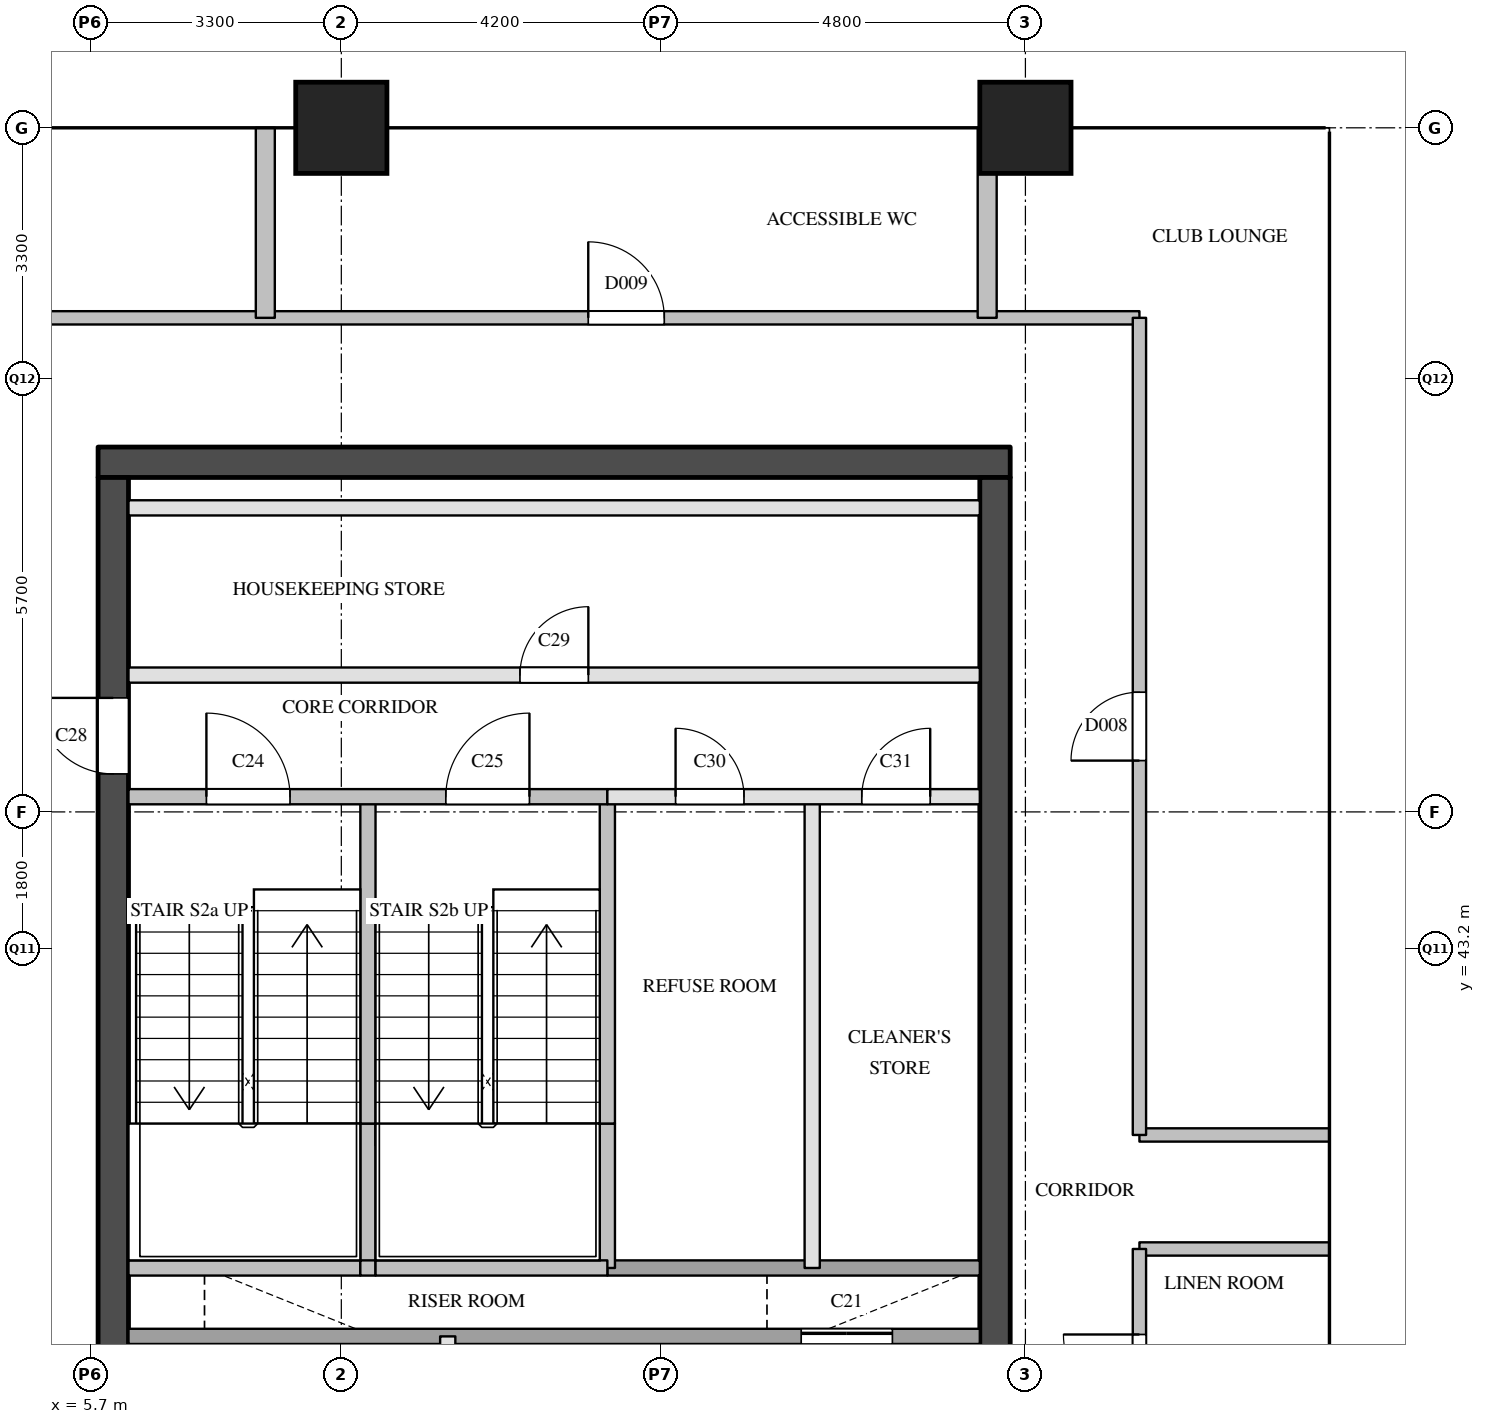
"""IFC4 building model, lengths in metres.
Left out: names, types, materials, properties, quantities, classifications, styles, units other than length and angle.
Written with IfcOpenShell. Run it as: python <this file> out.ifc"""

import sys

from ifc_helpers import new_model, si_unit, direction, frame, frame_2d, origin, origin_2d, place, context, subcontext, project, spatial, rectangle, extrude, element, fill, save


model = new_model("IFC4")
c1 = context("Model", 3, precision=1e-05, world=origin(), true_north=direction((0.0, 1.0)))
c2 = subcontext(c1, "Body", "Model", "MODEL_VIEW")
j1 = project(units=[si_unit("LENGTHUNIT", "METRE"), si_unit("PLANEANGLEUNIT", "RADIAN")], contexts=[c1])
p1 = place(None, origin())
s1 = spatial("IfcSite", under=j1, at=p1, CompositionType="ELEMENT")
p2 = place(p1, origin())
s2 = spatial("IfcBuilding", under=s1, at=p2, CompositionType="ELEMENT")
p3 = place(p2, frame((0.0, 0.0, 211.1)))
s3 = spatial("IfcBuildingStorey", under=s2, at=p3, CompositionType="ELEMENT", Elevation=211.1)
for number, where, z_axis, x_axis in (
    (1, (9.0, 54.0, 0.0), (0.0, 0.0, 1.0), (1.0, 0.0, 0.0)),
    (2, (18.0, 54.0, 0.0), (0.0, 0.0, 1.0), (1.0, 0.0, 0.0)),
):
    element("IfcColumn", number, at=place(p3, frame(where, z_axis=z_axis, x_axis=x_axis)), inside=s3, PredefinedType="COLUMN", context=c2, shape_type="SweptSolid", body=[
        extrude(rectangle(XDim=1.2, YDim=1.2, at=origin_2d()), origin(), (0.0, 0.0, 1.0), 3.9),
    ])
p4 = place(p3, frame((5.8, 49.6, 0.0), z_axis=(0.0, 0.0, 1.0), x_axis=(1.0, 0.0, 0.0)))
e3 = element("IfcWall", 3, at=p4, inside=s3, PredefinedType="SHEAR", context=c2, shape_type="SweptSolid", body=[
    extrude(rectangle(XDim=12.0, YDim=0.4, at=frame_2d((6.0, 0.0))), origin(), (0.0, 0.0, 1.0), 3.6),
])
p5 = place(p3, frame((6.0, 29.1, 0.0), z_axis=(0.0, 0.0, 1.0), x_axis=(0.0, 1.0, 0.0)))
e4 = element("IfcWall", 4, at=p5, inside=s3, PredefinedType="SHEAR", context=c2, shape_type="SweptSolid", body=[
    extrude(rectangle(XDim=20.3, YDim=0.4, at=frame_2d((10.15, 0.0))), origin(), (0.0, 0.0, 1.0), 3.6),
])
p6 = place(p5, frame((3.45, 0.0, 0.0)))
e5 = element("IfcOpeningElement", 5, at=p6, cuts=e4, PredefinedType="OPENING", context=c2, shape_type="SweptSolid", body=[
    extrude(rectangle(XDim=1.0, YDim=2.1, at=frame_2d((0.5, 1.05))), frame((0.0, 0.21, 0.0), z_axis=(0.0, -1.0, 0.0), x_axis=(1.0, 0.0, 0.0)), (0.0, 0.0, 1.0), 0.42),
])
p7 = place(p5, frame((16.4, 0.0, 0.0)))
e6 = element("IfcOpeningElement", 6, at=p7, cuts=e4, PredefinedType="OPENING", context=c2, shape_type="SweptSolid", body=[
    extrude(rectangle(XDim=1.0, YDim=2.1, at=frame_2d((0.5, 1.05))), frame((0.0, 0.21, 0.0), z_axis=(0.0, -1.0, 0.0), x_axis=(1.0, 0.0, 0.0)), (0.0, 0.0, 1.0), 0.42),
])
p8 = place(p3, frame((17.6, 29.1, 0.0), z_axis=(0.0, 0.0, 1.0), x_axis=(0.0, 1.0, 0.0)))
e7 = element("IfcWall", 7, at=p8, inside=s3, PredefinedType="SHEAR", context=c2, shape_type="SweptSolid", body=[
    extrude(rectangle(XDim=20.3, YDim=0.4, at=frame_2d((10.15, 0.0))), origin(), (0.0, 0.0, 1.0), 3.6),
])
p9 = place(p8, frame((1.25, 0.0, 0.0)))
e8 = element("IfcOpeningElement", 8, at=p9, cuts=e7, PredefinedType="OPENING", context=c2, shape_type="SweptSolid", body=[
    extrude(rectangle(XDim=0.7, YDim=2.1, at=frame_2d((0.35, 1.05))), frame((0.0, 0.21, 0.0), z_axis=(0.0, -1.0, 0.0), x_axis=(1.0, 0.0, 0.0)), (0.0, 0.0, 1.0), 0.42),
])
p10 = place(p8, frame((7.05, 0.0, 0.0)))
e9 = element("IfcOpeningElement", 9, at=p10, cuts=e7, PredefinedType="OPENING", context=c2, shape_type="SweptSolid", body=[
    extrude(rectangle(XDim=0.7, YDim=2.1, at=frame_2d((0.35, 1.05))), frame((0.0, 0.21, 0.0), z_axis=(0.0, -1.0, 0.0), x_axis=(1.0, 0.0, 0.0)), (0.0, 0.0, 1.0), 0.42),
])
p11 = place(p8, frame((3.6, 0.0, 0.0)))
e10 = element("IfcOpeningElement", 10, at=p11, cuts=e7, PredefinedType="OPENING", context=c2, shape_type="SweptSolid", body=[
    extrude(rectangle(XDim=1.8, YDim=2.1, at=frame_2d((0.9, 1.05))), frame((0.0, 0.21, 0.0), z_axis=(0.0, -1.0, 0.0), x_axis=(1.0, 0.0, 0.0)), (0.0, 0.0, 1.0), 0.42),
])
p12 = place(p3, frame((9.35, 39.0, 0.0), z_axis=(0.0, 0.0, 1.0), x_axis=(0.0, 1.0, 0.0)))
e11 = element("IfcWall", 11, at=p12, inside=s3, PredefinedType="SOLIDWALL", context=c2, shape_type="SweptSolid", body=[
    extrude(rectangle(XDim=1.9, YDim=0.2, at=frame_2d((0.95, 0.0))), origin(), (0.0, 0.0, 1.0), 3.6),
])
p13 = place(p3, frame((9.35, 40.9, 0.0), z_axis=(0.0, 0.0, 1.0), x_axis=(0.0, 1.0, 0.0)))
e12 = element("IfcWall", 12, at=p13, inside=s3, PredefinedType="SOLIDWALL", context=c2, shape_type="SweptSolid", body=[
    extrude(rectangle(XDim=4.3, YDim=0.2, at=frame_2d((2.15, 0.0))), origin(), (0.0, 0.0, 1.0), 3.6),
])
p14 = place(p3, frame((10.4, 33.8, 0.0), z_axis=(0.0, 0.0, 1.0), x_axis=(0.0, 1.0, 0.0)))
e13 = element("IfcWall", 13, at=p14, inside=s3, PredefinedType="PARTITIONING", context=c2, shape_type="SweptSolid", body=[
    extrude(rectangle(XDim=4.3, YDim=0.2, at=frame_2d((2.15, 0.0))), origin(), (0.0, 0.0, 1.0), 3.6),
])
p15 = place(p3, frame((12.5, 39.0, 0.0), z_axis=(0.0, 0.0, 1.0), x_axis=(0.0, 1.0, 0.0)))
e14 = element("IfcWall", 14, at=p15, inside=s3, PredefinedType="SOLIDWALL", context=c2, shape_type="SweptSolid", body=[
    extrude(rectangle(XDim=1.9, YDim=0.2, at=frame_2d((0.95, 0.0))), origin(), (0.0, 0.0, 1.0), 3.6),
])
p16 = place(p3, frame((12.5, 40.9, 0.0), z_axis=(0.0, 0.0, 1.0), x_axis=(0.0, 1.0, 0.0)))
e15 = element("IfcWall", 15, at=p16, inside=s3, PredefinedType="SOLIDWALL", context=c2, shape_type="SweptSolid", body=[
    extrude(rectangle(XDim=4.3, YDim=0.2, at=frame_2d((2.15, 0.0))), origin(), (0.0, 0.0, 1.0), 3.6),
])
p17 = place(p3, frame((14.6, 34.9, 0.0), z_axis=(0.0, 0.0, 1.0), x_axis=(0.0, 1.0, 0.0)))
e16 = element("IfcWall", 16, at=p17, inside=s3, PredefinedType="SOLIDWALL", context=c2, shape_type="SweptSolid", body=[
    extrude(rectangle(XDim=3.2, YDim=0.2, at=frame_2d((1.6, 0.0))), origin(), (0.0, 0.0, 1.0), 3.6),
])
p18 = place(p3, frame((15.195, 39.0, 0.0), z_axis=(0.0, 0.0, 1.0), x_axis=(0.0, 1.0, 0.0)))
e17 = element("IfcWall", 17, at=p18, inside=s3, PredefinedType="PARTITIONING", context=c2, shape_type="SweptSolid", body=[
    extrude(rectangle(XDim=6.2, YDim=0.2, at=frame_2d((3.1, 0.0))), origin(), (0.0, 0.0, 1.0), 3.6),
])
p19 = place(p3, frame((16.7, 34.9, 0.0), z_axis=(0.0, 0.0, 1.0), x_axis=(0.0, 1.0, 0.0)))
e18 = element("IfcWall", 18, at=p19, inside=s3, PredefinedType="SOLIDWALL", context=c2, shape_type="SweptSolid", body=[
    extrude(rectangle(XDim=3.2, YDim=0.2, at=frame_2d((1.6, 0.0))), origin(), (0.0, 0.0, 1.0), 3.6),
])
p20 = place(p3, frame((6.2, 38.1, 0.0), z_axis=(0.0, 0.0, 1.0), x_axis=(1.0, 0.0, 0.0)))
e19 = element("IfcWall", 19, at=p20, inside=s3, PredefinedType="SOLIDWALL", context=c2, shape_type="SweptSolid", body=[
    extrude(rectangle(XDim=11.2, YDim=0.2, at=frame_2d((5.6, 0.0))), origin(), (0.0, 0.0, 1.0), 3.6),
])
p21 = place(p20, frame((8.85, 0.0, 0.0)))
e20 = element("IfcOpeningElement", 20, at=p21, cuts=e19, PredefinedType="OPENING", context=c2, shape_type="SweptSolid", body=[
    extrude(rectangle(XDim=1.2, YDim=2.1, at=frame_2d((0.6, 1.05))), frame((0.0, 0.11, 0.0), z_axis=(0.0, -1.0, 0.0), x_axis=(1.0, 0.0, 0.0)), (0.0, 0.0, 1.0), 0.22),
])
p22 = place(p3, frame((12.5, 39.0, 0.0), z_axis=(0.0, 0.0, 1.0), x_axis=(1.0, 0.0, 0.0)))
e21 = element("IfcWall", 21, at=p22, inside=s3, PredefinedType="SOLIDWALL", context=c2, shape_type="SweptSolid", body=[
    extrude(rectangle(XDim=4.9, YDim=0.2, at=frame_2d((2.45, 0.0))), origin(), (0.0, 0.0, 1.0), 3.6),
])
p23 = place(p3, frame((6.2, 39.0, 0.0), z_axis=(0.0, 0.0, 1.0), x_axis=(1.0, 0.0, 0.0)))
e22 = element("IfcWall", 22, at=p23, inside=s3, PredefinedType="SOLIDWALL", context=c2, shape_type="SweptSolid", body=[
    extrude(rectangle(XDim=3.05, YDim=0.2, at=frame_2d((1.525, 0.0))), origin(), (0.0, 0.0, 1.0), 3.6),
])
p24 = place(p3, frame((9.25, 39.0, 0.0), z_axis=(0.0, 0.0, 1.0), x_axis=(1.0, 0.0, 0.0)))
e23 = element("IfcWall", 23, at=p24, inside=s3, PredefinedType="SOLIDWALL", context=c2, shape_type="SweptSolid", body=[
    extrude(rectangle(XDim=0.2, YDim=0.2, at=frame_2d((0.1, 0.0))), origin(), (0.0, 0.0, 1.0), 3.6),
])
p25 = place(p3, frame((9.45, 39.0, 0.0), z_axis=(0.0, 0.0, 1.0), x_axis=(1.0, 0.0, 0.0)))
e24 = element("IfcWall", 24, at=p25, inside=s3, PredefinedType="SOLIDWALL", context=c2, shape_type="SweptSolid", body=[
    extrude(rectangle(XDim=3.05, YDim=0.2, at=frame_2d((1.525, 0.0))), origin(), (0.0, 0.0, 1.0), 3.6),
])
p26 = place(p3, frame((12.5, 45.2, 0.0), z_axis=(0.0, 0.0, 1.0), x_axis=(1.0, 0.0, 0.0)))
e25 = element("IfcWall", 25, at=p26, inside=s3, PredefinedType="PARTITIONING", context=c2, shape_type="SweptSolid", body=[
    extrude(rectangle(XDim=4.9, YDim=0.2, at=frame_2d((2.45, 0.0))), origin(), (0.0, 0.0, 1.0), 3.6),
])
p27 = place(p26, frame((0.897, 0.0, 0.0)))
e26 = element("IfcOpeningElement", 26, at=p27, cuts=e25, PredefinedType="OPENING", context=c2, shape_type="SweptSolid", body=[
    extrude(rectangle(XDim=0.9, YDim=2.1, at=frame_2d((0.45, 1.05))), frame((0.0, 0.11, 0.0), z_axis=(0.0, -1.0, 0.0), x_axis=(1.0, 0.0, 0.0)), (0.0, 0.0, 1.0), 0.22),
])
p28 = place(p26, frame((3.347, 0.0, 0.0)))
e27 = element("IfcOpeningElement", 27, at=p28, cuts=e25, PredefinedType="OPENING", context=c2, shape_type="SweptSolid", body=[
    extrude(rectangle(XDim=0.9, YDim=2.1, at=frame_2d((0.45, 1.05))), frame((0.0, 0.11, 0.0), z_axis=(0.0, -1.0, 0.0), x_axis=(1.0, 0.0, 0.0)), (0.0, 0.0, 1.0), 0.22),
])
p29 = place(p3, frame((6.2, 45.2, 0.0), z_axis=(0.0, 0.0, 1.0), x_axis=(1.0, 0.0, 0.0)))
e28 = element("IfcWall", 28, at=p29, inside=s3, PredefinedType="SOLIDWALL", context=c2, shape_type="SweptSolid", body=[
    extrude(rectangle(XDim=6.3, YDim=0.2, at=frame_2d((3.15, 0.0))), origin(), (0.0, 0.0, 1.0), 3.6),
])
p30 = place(p29, frame((1.025, 0.0, 0.0)))
e29 = element("IfcOpeningElement", 29, at=p30, cuts=e28, PredefinedType="OPENING", context=c2, shape_type="SweptSolid", body=[
    extrude(rectangle(XDim=1.1, YDim=2.1, at=frame_2d((0.55, 1.05))), frame((0.0, 0.11, 0.0), z_axis=(0.0, -1.0, 0.0), x_axis=(1.0, 0.0, 0.0)), (0.0, 0.0, 1.0), 0.22),
])
p31 = place(p29, frame((4.175, 0.0, 0.0)))
e30 = element("IfcOpeningElement", 30, at=p31, cuts=e28, PredefinedType="OPENING", context=c2, shape_type="SweptSolid", body=[
    extrude(rectangle(XDim=1.1, YDim=2.1, at=frame_2d((0.55, 1.05))), frame((0.0, 0.11, 0.0), z_axis=(0.0, -1.0, 0.0), x_axis=(1.0, 0.0, 0.0)), (0.0, 0.0, 1.0), 0.22),
])
p32 = place(p3, frame((6.2, 46.8, 0.0), z_axis=(0.0, 0.0, 1.0), x_axis=(1.0, 0.0, 0.0)))
e31 = element("IfcWall", 31, at=p32, inside=s3, PredefinedType="PARTITIONING", context=c2, shape_type="SweptSolid", body=[
    extrude(rectangle(XDim=11.2, YDim=0.2, at=frame_2d((5.6, 0.0))), origin(), (0.0, 0.0, 1.0), 3.6),
])
p33 = place(p32, frame((5.15, 0.0, 0.0)))
e32 = element("IfcOpeningElement", 32, at=p33, cuts=e31, PredefinedType="OPENING", context=c2, shape_type="SweptSolid", body=[
    extrude(rectangle(XDim=0.9, YDim=2.1, at=frame_2d((0.45, 1.05))), frame((0.0, 0.11, 0.0), z_axis=(0.0, -1.0, 0.0), x_axis=(1.0, 0.0, 0.0)), (0.0, 0.0, 1.0), 0.22),
])
p34 = place(p3, frame((6.2, 49.0, 0.0), z_axis=(0.0, 0.0, 1.0), x_axis=(1.0, 0.0, 0.0)))
e33 = element("IfcWall", 33, at=p34, inside=s3, PredefinedType="PARTITIONING", context=c2, shape_type="SweptSolid", body=[
    extrude(rectangle(XDim=11.2, YDim=0.2, at=frame_2d((5.6, 0.0))), origin(), (0.0, 0.0, 1.0), 3.6),
])
for number, where, z_axis, x_axis in (
    (34, (19.5, 39.25, 0.0), (0.0, 0.0, 1.0), (1.0, 0.0, 0.0)),
    (35, (19.5, 40.75, 0.0), (0.0, 0.0, 1.0), (1.0, 0.0, 0.0)),
):
    element("IfcWall", number, at=place(p3, frame(where, z_axis=z_axis, x_axis=x_axis)), inside=s3, PredefinedType="PARTITIONING", context=c2, shape_type="SweptSolid", body=[
        extrude(rectangle(XDim=2.5, YDim=0.175, at=frame_2d((1.25, 0.0))), origin(), (0.0, 0.0, 1.0), 3.6),
    ])
p35 = place(p3, frame((4.1, 51.5, 0.0), z_axis=(0.0, 0.0, 1.0), x_axis=(1.0, 0.0, 0.0)))
e36 = element("IfcWall", 36, at=p35, inside=s3, PredefinedType="PARTITIONING", context=c2, shape_type="SweptSolid", body=[
    extrude(rectangle(XDim=15.4, YDim=0.175, at=frame_2d((7.7, 0.0))), origin(), (0.0, 0.0, 1.0), 3.6),
])
p36 = place(p35, frame((8.149, 0.0, 0.0)))
e37 = element("IfcOpeningElement", 37, at=p36, cuts=e36, PredefinedType="OPENING", context=c2, shape_type="SweptSolid", body=[
    extrude(rectangle(XDim=1.0, YDim=2.1, at=frame_2d((0.5, 1.05))), frame((0.0, 0.097, 0.0), z_axis=(0.0, -1.0, 0.0), x_axis=(1.0, 0.0, 0.0)), (0.0, 0.0, 1.0), 0.195),
])
p37 = place(p3, frame((19.5, 28.5, 0.0), z_axis=(0.0, 0.0, 1.0), x_axis=(0.0, 1.0, 0.0)))
e38 = element("IfcWall", 38, at=p37, inside=s3, PredefinedType="PARTITIONING", context=c2, shape_type="SweptSolid", body=[
    extrude(rectangle(XDim=10.75, YDim=0.175, at=frame_2d((5.375, 0.0))), origin(), (0.0, 0.0, 1.0), 3.6),
])
p38 = place(p37, frame((8.625, 0.0, 0.0)))
e39 = element("IfcOpeningElement", 39, at=p38, cuts=e38, PredefinedType="OPENING", context=c2, shape_type="SweptSolid", body=[
    extrude(rectangle(XDim=1.0, YDim=2.1, at=frame_2d((0.5, 1.05))), frame((0.0, 0.097, 0.0), z_axis=(0.0, -1.0, 0.0), x_axis=(1.0, 0.0, 0.0)), (0.0, 0.0, 1.0), 0.195),
])
p39 = place(p3, frame((19.5, 40.75, 0.0), z_axis=(0.0, 0.0, 1.0), x_axis=(0.0, 1.0, 0.0)))
e40 = element("IfcWall", 40, at=p39, inside=s3, PredefinedType="PARTITIONING", context=c2, shape_type="SweptSolid", body=[
    extrude(rectangle(XDim=10.75, YDim=0.175, at=frame_2d((5.375, 0.0))), origin(), (0.0, 0.0, 1.0), 3.6),
])
p40 = place(p39, frame((4.925, 0.0, 0.0)))
e41 = element("IfcOpeningElement", 41, at=p40, cuts=e40, PredefinedType="OPENING", context=c2, shape_type="SweptSolid", body=[
    extrude(rectangle(XDim=0.9, YDim=2.1, at=frame_2d((0.45, 1.05))), frame((0.0, 0.097, 0.0), z_axis=(0.0, -1.0, 0.0), x_axis=(1.0, 0.0, 0.0)), (0.0, 0.0, 1.0), 0.195),
])
p41 = place(p3, frame((8.0, 51.5, 0.0), z_axis=(0.0, 0.0, 1.0), x_axis=(0.0, 1.0, 0.0)))
e42 = element("IfcWall", 42, at=p41, inside=s3, PredefinedType="PARTITIONING", context=c2, shape_type="SweptSolid", body=[
    extrude(rectangle(XDim=2.5, YDim=0.25, at=frame_2d((1.25, 0.0))), origin(), (0.0, 0.0, 1.0), 2.6),
])
p42 = place(p3, frame((17.497, 51.5, 0.0), z_axis=(0.0, 0.0, 1.0), x_axis=(0.0, 1.0, 0.0)))
e43 = element("IfcWall", 43, at=p42, inside=s3, PredefinedType="PARTITIONING", context=c2, shape_type="SweptSolid", body=[
    extrude(rectangle(XDim=2.5, YDim=0.25, at=frame_2d((1.25, 0.0))), origin(), (0.0, 0.0, 1.0), 3.6),
])
p43 = place(p21, origin())
e44 = element("IfcDoor", 44, at=p43, inside=s3, OperationType="SLIDING_TO_LEFT", PredefinedType="DOOR", context=c2, shape_type="SweptSolid", body=[
    extrude(rectangle(XDim=1.2, YDim=2.1, at=frame_2d((0.6, 1.05))), frame((0.0, 0.025, 0.0), z_axis=(0.0, -1.0, 0.0), x_axis=(1.0, 0.0, 0.0)), (0.0, 0.0, 1.0), 0.05),
])
fill(e20, e44)
p44 = place(p30, origin())
e45 = element("IfcDoor", 45, at=p44, inside=s3, OperationType="SINGLE_SWING_LEFT", PredefinedType="DOOR", context=c2, shape_type="SweptSolid", body=[
    extrude(rectangle(XDim=1.1, YDim=2.1, at=frame_2d((0.55, 1.05))), frame((0.0, 0.025, 0.0), z_axis=(0.0, -1.0, 0.0), x_axis=(1.0, 0.0, 0.0)), (0.0, 0.0, 1.0), 0.05),
])
fill(e29, e45)
p45 = place(p31, origin())
e46 = element("IfcDoor", 46, at=p45, inside=s3, OperationType="SINGLE_SWING_RIGHT", PredefinedType="DOOR", context=c2, shape_type="SweptSolid", body=[
    extrude(rectangle(XDim=1.1, YDim=2.1, at=frame_2d((0.55, 1.05))), frame((0.0, 0.025, 0.0), z_axis=(0.0, -1.0, 0.0), x_axis=(1.0, 0.0, 0.0)), (0.0, 0.0, 1.0), 0.05),
])
fill(e30, e46)
p46 = place(p7, origin())
e47 = element("IfcDoor", 47, at=p46, inside=s3, OperationType="SINGLE_SWING_RIGHT", PredefinedType="DOOR", context=c2, shape_type="SweptSolid", body=[
    extrude(rectangle(XDim=1.0, YDim=2.1, at=frame_2d((0.5, 1.05))), frame((0.0, 0.025, 0.0), z_axis=(0.0, -1.0, 0.0), x_axis=(1.0, 0.0, 0.0)), (0.0, 0.0, 1.0), 0.05),
])
fill(e6, e47)
p47 = place(p33, origin())
e48 = element("IfcDoor", 48, at=p47, inside=s3, OperationType="SINGLE_SWING_RIGHT", PredefinedType="DOOR", context=c2, shape_type="SweptSolid", body=[
    extrude(rectangle(XDim=0.9, YDim=2.1, at=frame_2d((0.45, 1.05))), frame((0.0, 0.025, 0.0), z_axis=(0.0, -1.0, 0.0), x_axis=(1.0, 0.0, 0.0)), (0.0, 0.0, 1.0), 0.05),
])
fill(e32, e48)
p48 = place(p27, origin())
e49 = element("IfcDoor", 49, at=p48, inside=s3, OperationType="SINGLE_SWING_LEFT", PredefinedType="DOOR", context=c2, shape_type="SweptSolid", body=[
    extrude(rectangle(XDim=0.9, YDim=2.1, at=frame_2d((0.45, 1.05))), frame((0.0, 0.025, 0.0), z_axis=(0.0, -1.0, 0.0), x_axis=(1.0, 0.0, 0.0)), (0.0, 0.0, 1.0), 0.05),
])
fill(e26, e49)
p49 = place(p28, origin())
e50 = element("IfcDoor", 50, at=p49, inside=s3, OperationType="SINGLE_SWING_RIGHT", PredefinedType="DOOR", context=c2, shape_type="SweptSolid", body=[
    extrude(rectangle(XDim=0.9, YDim=2.1, at=frame_2d((0.45, 1.05))), frame((0.0, 0.025, 0.0), z_axis=(0.0, -1.0, 0.0), x_axis=(1.0, 0.0, 0.0)), (0.0, 0.0, 1.0), 0.05),
])
fill(e27, e50)
p50 = place(p38, origin())
e51 = element("IfcDoor", 51, at=p50, inside=s3, OperationType="SINGLE_SWING_RIGHT", PredefinedType="DOOR", context=c2, shape_type="SweptSolid", body=[
    extrude(rectangle(XDim=1.0, YDim=2.1, at=frame_2d((0.5, 1.05))), frame((0.0, 0.025, 0.0), z_axis=(0.0, -1.0, 0.0), x_axis=(1.0, 0.0, 0.0)), (0.0, 0.0, 1.0), 0.05),
])
fill(e39, e51)
p51 = place(p40, origin())
e52 = element("IfcDoor", 52, at=p51, inside=s3, OperationType="SINGLE_SWING_LEFT", PredefinedType="DOOR", context=c2, shape_type="SweptSolid", body=[
    extrude(rectangle(XDim=0.9, YDim=2.1, at=frame_2d((0.45, 1.05))), frame((0.0, 0.025, 0.0), z_axis=(0.0, -1.0, 0.0), x_axis=(1.0, 0.0, 0.0)), (0.0, 0.0, 1.0), 0.05),
])
fill(e41, e52)
p52 = place(p36, origin())
e53 = element("IfcDoor", 53, at=p52, inside=s3, OperationType="SINGLE_SWING_LEFT", PredefinedType="DOOR", context=c2, shape_type="SweptSolid", body=[
    extrude(rectangle(XDim=1.0, YDim=2.1, at=frame_2d((0.5, 1.05))), frame((0.0, 0.025, 0.0), z_axis=(0.0, -1.0, 0.0), x_axis=(1.0, 0.0, 0.0)), (0.0, 0.0, 1.0), 0.05),
])
fill(e37, e53)
save(model, sys.argv[1])
